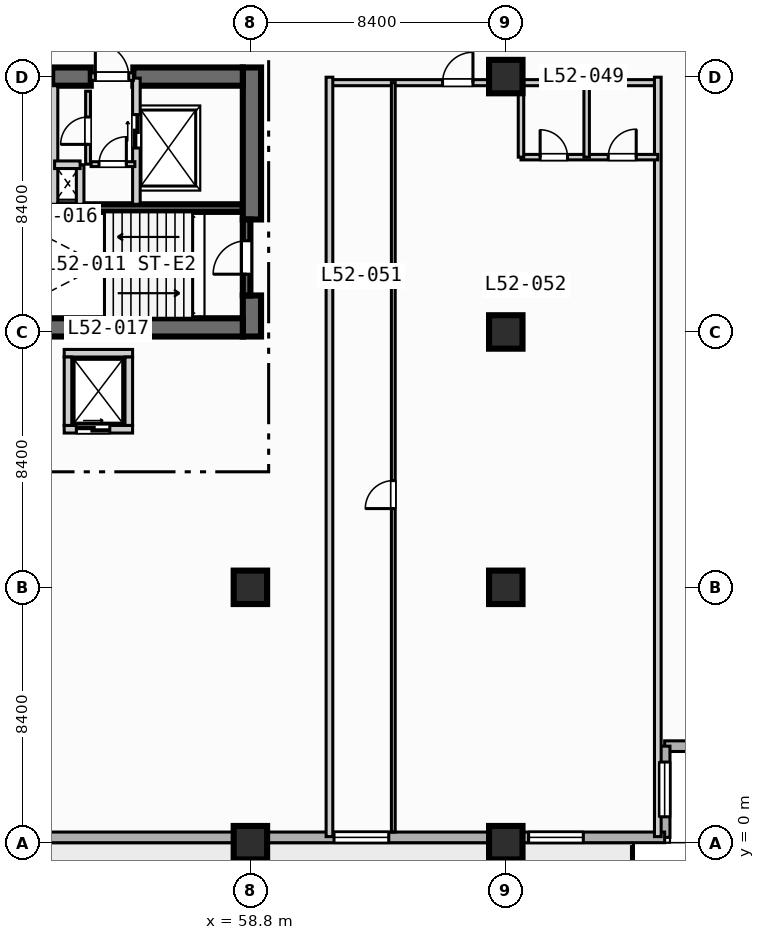
"""IFC4 building model, lengths in metres.
Left out: names, types, materials, properties, quantities, classifications, styles, units other than length and angle.
Written with IfcOpenShell. Run it as: python <this file> out.ifc"""

import sys

from ifc_helpers import new_model, si_unit, direction, frame, frame_2d, origin, origin_2d, place, context, subcontext, project, spatial, rectangle, extrude, element, fill, save


model = new_model("IFC4")
c1 = context("Model", 3, precision=1e-05, world=origin(), true_north=direction((0.0, 1.0)))
c2 = subcontext(c1, "Body", "Model", "MODEL_VIEW")
j1 = project(units=[si_unit("LENGTHUNIT", "METRE"), si_unit("PLANEANGLEUNIT", "RADIAN")], contexts=[c1])
p1 = place(None, origin())
s1 = spatial("IfcSite", under=j1, at=p1, CompositionType="ELEMENT")
p2 = place(p1, origin())
s2 = spatial("IfcBuilding", under=s1, at=p2, CompositionType="ELEMENT")
p3 = place(p2, frame((0.0, 0.0, 212.4)))
s3 = spatial("IfcBuildingStorey", under=s2, at=p3, CompositionType="ELEMENT", Elevation=212.4)
p4 = place(p3, frame((50.5, 20.875, 0.0), z_axis=(0.0, 0.0, 1.0), x_axis=(1.0, 0.0, 0.0)))
e1 = element("IfcWall", 1, at=p4, inside=s3, PredefinedType="SOLIDWALL", context=c2, shape_type="SweptSolid", body=[
    extrude(rectangle(XDim=8.05, YDim=0.25, at=frame_2d((4.025, 0.0))), origin(), (0.0, 0.0, 1.0), 3.47),
])
p5 = place(p3, frame((58.85, 16.65, 0.0), z_axis=(0.0, 0.0, 1.0), x_axis=(0.0, 1.0, 0.0)))
e2 = element("IfcWall", 2, at=p5, inside=s3, PredefinedType="SHEAR", context=c2, shape_type="SweptSolid", body=[
    extrude(rectangle(XDim=1.35, YDim=0.6, at=frame_2d((0.675, 0.0))), origin(), (0.0, 0.0, 1.0), 3.47),
])
p6 = place(p3, frame((58.85, 20.5, 0.0), z_axis=(0.0, 0.0, 1.0), x_axis=(0.0, 1.0, 0.0)))
e3 = element("IfcWall", 3, at=p6, inside=s3, PredefinedType="SHEAR", context=c2, shape_type="SweptSolid", body=[
    extrude(rectangle(XDim=5.0, YDim=0.6, at=frame_2d((2.5, 0.0))), origin(), (0.0, 0.0, 1.0), 3.47),
])
p7 = place(p3, frame((42.2, 16.95, 0.0), z_axis=(0.0, 0.0, 1.0), x_axis=(1.0, 0.0, 0.0)))
e4 = element("IfcWall", 4, at=p7, inside=s3, PredefinedType="SHEAR", context=c2, shape_type="SweptSolid", body=[
    extrude(rectangle(XDim=16.35, YDim=0.6, at=frame_2d((8.175, 0.0))), origin(), (0.0, 0.0, 1.0), 3.47),
])
p8 = place(p3, frame((52.28, 25.2, 0.0), z_axis=(0.0, 0.0, 1.0), x_axis=(1.0, 0.0, 0.0)))
e5 = element("IfcWall", 5, at=p8, inside=s3, PredefinedType="SHEAR", context=c2, shape_type="SweptSolid", body=[
    extrude(rectangle(XDim=1.27, YDim=0.6, at=frame_2d((0.635, 0.0))), origin(), (0.0, 0.0, 1.0), 3.47),
])
p9 = place(p3, frame((54.95, 25.2, 0.0), z_axis=(0.0, 0.0, 1.0), x_axis=(1.0, 0.0, 0.0)))
e6 = element("IfcWall", 6, at=p9, inside=s3, PredefinedType="SHEAR", context=c2, shape_type="SweptSolid", body=[
    extrude(rectangle(XDim=3.6, YDim=0.6, at=frame_2d((1.8, 0.0))), origin(), (0.0, 0.0, 1.0), 3.47),
])
for number, where, z_axis, x_axis in (
    (7, (58.8, 0.0, 0.0), (0.0, 0.0, 1.0), (1.0, 0.0, 0.0)),
    (8, (58.8, 8.4, 0.0), (0.0, 0.0, 1.0), (1.0, 0.0, 0.0)),
    (9, (67.2, 0.0, 0.0), (0.0, 0.0, 1.0), (1.0, 0.0, 0.0)),
    (10, (67.2, 8.4, 0.0), (0.0, 0.0, 1.0), (1.0, 0.0, 0.0)),
    (11, (67.2, 16.8, 0.0), (0.0, 0.0, 1.0), (1.0, 0.0, 0.0)),
    (12, (67.2, 25.2, 0.0), (0.0, 0.0, 1.0), (1.0, 0.0, 0.0)),
):
    element("IfcColumn", number, at=place(p3, frame(where, z_axis=z_axis, x_axis=x_axis)), inside=s3, PredefinedType="COLUMN", context=c2, shape_type="SweptSolid", body=[
        extrude(rectangle(XDim=1.1, YDim=1.1, at=origin_2d()), origin(), (0.0, 0.0, 1.0), 3.7),
    ])
p10 = place(p3, frame((75.425, 3.175, 0.0), z_axis=(0.0, 0.0, 1.0), x_axis=(-1.0, 0.0, 0.0)))
e13 = element("IfcWall", 13, at=p10, inside=s3, PredefinedType="STANDARD", context=c2, shape_type="SweptSolid", body=[
    extrude(rectangle(XDim=3.0, YDim=0.35, at=frame_2d((1.5, 0.0))), origin(), (0.0, 0.0, 1.0), 3.47),
])
p11 = place(p3, frame((72.425, 3.175, 0.0), z_axis=(0.0, 0.0, 1.0), x_axis=(0.0, -1.0, 0.0)))
e14 = element("IfcWall", 14, at=p11, inside=s3, PredefinedType="STANDARD", context=c2, shape_type="SweptSolid", body=[
    extrude(rectangle(XDim=3.0, YDim=0.35, at=frame_2d((1.5, 0.0))), origin(), (0.0, 0.0, 1.0), 3.47),
])
p12 = place(p11, frame((0.522, 0.0, 0.85)))
e15 = element("IfcOpeningElement", 15, at=p12, cuts=e14, PredefinedType="OPENING", context=c2, shape_type="SweptSolid", body=[
    extrude(rectangle(XDim=1.8, YDim=1.8, at=frame_2d((0.9, 0.9))), frame((0.0, 0.185, 0.0), z_axis=(0.0, -1.0, 0.0), x_axis=(1.0, 0.0, 0.0)), (0.0, 0.0, 1.0), 0.37),
])
p13 = place(p3, frame((72.425, 0.175, 0.0), z_axis=(0.0, 0.0, 1.0), x_axis=(-1.0, 0.0, 0.0)))
e16 = element("IfcWall", 16, at=p13, inside=s3, PredefinedType="STANDARD", context=c2, shape_type="SweptSolid", body=[
    extrude(rectangle(XDim=69.25, YDim=0.35, at=frame_2d((34.625, 0.0))), origin(), (0.0, 0.0, 1.0), 3.47),
])
p14 = place(p13, frame((50.725, 0.0, 0.0)))
e17 = element("IfcOpeningElement", 17, at=p14, cuts=e16, PredefinedType="OPENING", context=c2, shape_type="SweptSolid", body=[
    extrude(rectangle(XDim=1.4, YDim=2.2, at=frame_2d((0.7, 1.1))), frame((0.0, 0.185, 0.0), z_axis=(0.0, -1.0, 0.0), x_axis=(1.0, 0.0, 0.0)), (0.0, 0.0, 1.0), 0.37),
])
p15 = place(p13, frame((58.625, 0.0, 0.85)))
e18 = element("IfcOpeningElement", 18, at=p15, cuts=e16, PredefinedType="OPENING", context=c2, shape_type="SweptSolid", body=[
    extrude(rectangle(XDim=2.4, YDim=1.95, at=frame_2d((1.2, 0.975))), frame((0.0, 0.185, 0.0), z_axis=(0.0, -1.0, 0.0), x_axis=(1.0, 0.0, 0.0)), (0.0, 0.0, 1.0), 0.37),
])
p16 = place(p13, frame((33.725, 0.0, 0.85)))
e19 = element("IfcOpeningElement", 19, at=p16, cuts=e16, PredefinedType="OPENING", context=c2, shape_type="SweptSolid", body=[
    extrude(rectangle(XDim=1.8, YDim=1.8, at=frame_2d((0.9, 0.9))), frame((0.0, 0.185, 0.0), z_axis=(0.0, -1.0, 0.0), x_axis=(1.0, 0.0, 0.0)), (0.0, 0.0, 1.0), 0.37),
])
p17 = place(p13, frame((25.025, 0.0, 0.85)))
e20 = element("IfcOpeningElement", 20, at=p17, cuts=e16, PredefinedType="OPENING", context=c2, shape_type="SweptSolid", body=[
    extrude(rectangle(XDim=2.4, YDim=1.95, at=frame_2d((1.2, 0.975))), frame((0.0, 0.185, 0.0), z_axis=(0.0, -1.0, 0.0), x_axis=(1.0, 0.0, 0.0)), (0.0, 0.0, 1.0), 0.37),
])
p18 = place(p13, frame((9.075, 0.0, 0.85)))
e21 = element("IfcOpeningElement", 21, at=p18, cuts=e16, PredefinedType="OPENING", context=c2, shape_type="SweptSolid", body=[
    extrude(rectangle(XDim=1.8, YDim=1.8, at=frame_2d((0.9, 0.9))), frame((0.0, 0.185, 0.0), z_axis=(0.0, -1.0, 0.0), x_axis=(1.0, 0.0, 0.0)), (0.0, 0.0, 1.0), 0.37),
])
p19 = place(p13, frame((2.675, 0.0, 0.85)))
e22 = element("IfcOpeningElement", 22, at=p19, cuts=e16, PredefinedType="OPENING", context=c2, shape_type="SweptSolid", body=[
    extrude(rectangle(XDim=1.8, YDim=1.8, at=frame_2d((0.9, 0.9))), frame((0.0, 0.185, 0.0), z_axis=(0.0, -1.0, 0.0), x_axis=(1.0, 0.0, 0.0)), (0.0, 0.0, 1.0), 0.37),
])
p20 = place(p3, frame((58.675, 18.0, 0.0), z_axis=(0.0, 0.0, 1.0), x_axis=(0.0, 1.0, 0.0)))
e23 = element("IfcWall", 23, at=p20, inside=s3, PredefinedType="SOLIDWALL", context=c2, shape_type="SweptSolid", body=[
    extrude(rectangle(XDim=2.5, YDim=0.25, at=frame_2d((1.25, 0.0))), origin(), (0.0, 0.0, 1.0), 3.47),
])
p21 = place(p20, frame((0.7, 0.0, 0.0)))
e24 = element("IfcOpeningElement", 24, at=p21, cuts=e23, PredefinedType="OPENING", context=c2, shape_type="SweptSolid", body=[
    extrude(rectangle(XDim=1.1, YDim=2.15, at=frame_2d((0.55, 1.075))), frame((0.0, 0.135, 0.0), z_axis=(0.0, -1.0, 0.0), x_axis=(1.0, 0.0, 0.0)), (0.0, 0.0, 1.0), 0.27),
])
p22 = place(p3, frame((52.34, 21.0, 0.0), z_axis=(0.0, 0.0, 1.0), x_axis=(0.0, 1.0, 0.0)))
e25 = element("IfcWall", 25, at=p22, inside=s3, PredefinedType="SOLIDWALL", context=c2, shape_type="SweptSolid", body=[
    extrude(rectangle(XDim=3.9, YDim=0.25, at=frame_2d((1.95, 0.0))), origin(), (0.0, 0.0, 1.0), 3.47),
])
p23 = place(p3, frame((55.05, 21.0, 0.0), z_axis=(0.0, 0.0, 1.0), x_axis=(0.0, 1.0, 0.0)))
e26 = element("IfcWall", 26, at=p23, inside=s3, PredefinedType="SOLIDWALL", context=c2, shape_type="SweptSolid", body=[
    extrude(rectangle(XDim=4.15, YDim=0.25, at=frame_2d((2.075, 0.0))), origin(), (0.0, 0.0, 1.0), 3.47),
])
p24 = place(p23, frame((1.85, 0.0, 0.0)))
e27 = element("IfcOpeningElement", 27, at=p24, cuts=e26, PredefinedType="OPENING", context=c2, shape_type="SweptSolid", body=[
    extrude(rectangle(XDim=1.1, YDim=2.15, at=frame_2d((0.55, 1.075))), frame((0.0, 0.135, 0.0), z_axis=(0.0, -1.0, 0.0), x_axis=(1.0, 0.0, 0.0)), (0.0, 0.0, 1.0), 0.27),
])
p25 = place(p3, frame((53.55, 25.2, 0.0), z_axis=(0.0, 0.0, 1.0), x_axis=(1.0, 0.0, 0.0)))
e28 = element("IfcWall", 28, at=p25, inside=s3, PredefinedType="SOLIDWALL", context=c2, shape_type="SweptSolid", body=[
    extrude(rectangle(XDim=1.4, YDim=0.25, at=frame_2d((0.7, 0.0))), origin(), (0.0, 0.0, 1.0), 3.47),
])
p26 = place(p25, frame((0.15, 0.0, 0.0)))
e29 = element("IfcOpeningElement", 29, at=p26, cuts=e28, PredefinedType="OPENING", context=c2, shape_type="SweptSolid", body=[
    extrude(rectangle(XDim=1.1, YDim=2.15, at=frame_2d((0.55, 1.075))), frame((0.0, 0.135, 0.0), z_axis=(0.0, -1.0, 0.0), x_axis=(1.0, 0.0, 0.0)), (0.0, 0.0, 1.0), 0.27),
])
p27 = place(p3, frame((53.2, 21.0, 0.0), z_axis=(0.0, 0.0, 1.0), x_axis=(0.0, 1.0, 0.0)))
e30 = element("IfcWall", 30, at=p27, inside=s3, PredefinedType="SOLIDWALL", context=c2, shape_type="SweptSolid", body=[
    extrude(rectangle(XDim=1.3, YDim=0.25, at=frame_2d((0.65, 0.0))), origin(), (0.0, 0.0, 1.0), 3.47),
])
p28 = place(p3, frame((52.36, 22.3, 0.0), z_axis=(0.0, 0.0, 1.0), x_axis=(1.0, 0.0, 0.0)))
e31 = element("IfcWall", 31, at=p28, inside=s3, PredefinedType="SOLIDWALL", context=c2, shape_type="SweptSolid", body=[
    extrude(rectangle(XDim=0.84, YDim=0.25, at=frame_2d((0.42, 0.0))), origin(), (0.0, 0.0, 1.0), 3.47),
])
p29 = place(p3, frame((53.56, 22.32, 0.0), z_axis=(0.0, 0.0, 1.0), x_axis=(1.0, 0.0, 0.0)))
e32 = element("IfcWall", 32, at=p29, inside=s3, PredefinedType="PARTITIONING", context=c2, shape_type="SweptSolid", body=[
    extrude(rectangle(XDim=1.44, YDim=0.16, at=frame_2d((0.72, 0.0))), origin(), (0.0, 0.0, 1.0), 3.47),
])
p30 = place(p29, frame((0.26, 0.0, 0.0)))
e33 = element("IfcOpeningElement", 33, at=p30, cuts=e32, PredefinedType="OPENING", context=c2, shape_type="SweptSolid", body=[
    extrude(rectangle(XDim=0.9, YDim=2.1, at=frame_2d((0.45, 1.05))), frame((0.0, 0.09, 0.0), z_axis=(0.0, -1.0, 0.0), x_axis=(1.0, 0.0, 0.0)), (0.0, 0.0, 1.0), 0.18),
])
p31 = place(p3, frame((53.46, 22.32, 0.0), z_axis=(0.0, 0.0, 1.0), x_axis=(0.0, 1.0, 0.0)))
e34 = element("IfcWall", 34, at=p31, inside=s3, PredefinedType="PARTITIONING", context=c2, shape_type="SweptSolid", body=[
    extrude(rectangle(XDim=2.4, YDim=0.16, at=frame_2d((1.2, 0.0))), origin(), (0.0, 0.0, 1.0), 3.47),
])
p32 = place(p31, frame((0.65, 0.0, 0.0)))
e35 = element("IfcOpeningElement", 35, at=p32, cuts=e34, PredefinedType="OPENING", context=c2, shape_type="SweptSolid", body=[
    extrude(rectangle(XDim=0.9, YDim=2.1, at=frame_2d((0.45, 1.05))), frame((0.0, 0.09, 0.0), z_axis=(0.0, -1.0, 0.0), x_axis=(1.0, 0.0, 0.0)), (0.0, 0.0, 1.0), 0.18),
])
p33 = place(p3, frame((52.675, 13.6, 0.0), z_axis=(0.0, 0.0, 1.0), x_axis=(1.0, 0.0, 0.0)))
e36 = element("IfcWall", 36, at=p33, inside=s3, PredefinedType="SOLIDWALL", context=c2, shape_type="SweptSolid", body=[
    extrude(rectangle(XDim=2.25, YDim=0.25, at=frame_2d((1.125, 0.0))), origin(), (0.0, 0.0, 1.0), 3.47),
])
p34 = place(p33, frame((0.4, 0.0, 0.0)))
e37 = element("IfcOpeningElement", 37, at=p34, cuts=e36, PredefinedType="OPENING", context=c2, shape_type="SweptSolid", body=[
    extrude(rectangle(XDim=1.1, YDim=2.15, at=frame_2d((0.55, 1.075))), frame((0.0, 0.135, 0.0), z_axis=(0.0, -1.0, 0.0), x_axis=(1.0, 0.0, 0.0)), (0.0, 0.0, 1.0), 0.27),
])
for number, where, z_axis, x_axis in (
    (38, (52.675, 16.1, 0.0), (0.0, 0.0, 1.0), (1.0, 0.0, 0.0)),
    (39, (52.8, 13.725, 0.0), (0.0, 0.0, 1.0), (0.0, 1.0, 0.0)),
    (40, (54.8, 13.725, 0.0), (0.0, 0.0, 1.0), (0.0, 1.0, 0.0)),
):
    element("IfcWall", number, at=place(p3, frame(where, z_axis=z_axis, x_axis=x_axis)), inside=s3, PredefinedType="SOLIDWALL", context=c2, shape_type="SweptSolid", body=[
        extrude(rectangle(XDim=2.25, YDim=0.25, at=frame_2d((1.125, 0.0))), origin(), (0.0, 0.0, 1.0), 3.47),
    ])
p35 = place(p3, frame((61.4, 25.0, 0.0), z_axis=(0.0, 0.0, 1.0), x_axis=(1.0, 0.0, 0.0)))
e41 = element("IfcWall", 41, at=p35, inside=s3, PredefinedType="PARTITIONING", context=c2, shape_type="SweptSolid", body=[
    extrude(rectangle(XDim=10.8, YDim=0.2, at=frame_2d((5.4, 0.0))), origin(), (0.0, 0.0, 1.0), 2.82),
])
p36 = place(p35, frame((3.72, 0.0, 0.0)))
e42 = element("IfcOpeningElement", 42, at=p36, cuts=e41, PredefinedType="OPENING", context=c2, shape_type="SweptSolid", body=[
    extrude(rectangle(XDim=1.0, YDim=2.15, at=frame_2d((0.5, 1.075))), frame((0.0, 0.11, 0.0), z_axis=(0.0, -1.0, 0.0), x_axis=(1.0, 0.0, 0.0)), (0.0, 0.0, 1.0), 0.22),
])
for number, where, z_axis, x_axis in (
    (43, (61.4, 0.2, 0.0), (0.0, 0.0, 1.0), (0.0, 1.0, 0.0)),
    (44, (72.2, 0.2, 0.0), (0.0, 0.0, 1.0), (0.0, 1.0, 0.0)),
):
    element("IfcWall", number, at=place(p3, frame(where, z_axis=z_axis, x_axis=x_axis)), inside=s3, PredefinedType="PARTITIONING", context=c2, shape_type="SweptSolid", body=[
        extrude(rectangle(XDim=24.98, YDim=0.22, at=frame_2d((12.49, 0.0))), origin(), (0.0, 0.0, 1.0), 3.47),
    ])
p37 = place(p3, frame((67.7, 22.55, 0.0), z_axis=(0.0, 0.0, 1.0), x_axis=(1.0, 0.0, 0.0)))
e45 = element("IfcWall", 45, at=p37, inside=s3, PredefinedType="PLUMBINGWALL", context=c2, shape_type="SweptSolid", body=[
    extrude(rectangle(XDim=4.5, YDim=0.18, at=frame_2d((2.25, 0.0))), origin(), (0.0, 0.0, 1.0), 3.47),
])
p38 = place(p37, frame((0.63, 0.0, 0.0)))
e46 = element("IfcOpeningElement", 46, at=p38, cuts=e45, PredefinedType="OPENING", context=c2, shape_type="SweptSolid", body=[
    extrude(rectangle(XDim=0.9, YDim=2.1, at=frame_2d((0.45, 1.05))), frame((0.0, 0.1, 0.0), z_axis=(0.0, -1.0, 0.0), x_axis=(1.0, 0.0, 0.0)), (0.0, 0.0, 1.0), 0.2),
])
p39 = place(p37, frame((2.87, 0.0, 0.0)))
e47 = element("IfcOpeningElement", 47, at=p39, cuts=e45, PredefinedType="OPENING", context=c2, shape_type="SweptSolid", body=[
    extrude(rectangle(XDim=0.92, YDim=2.1, at=frame_2d((0.46, 1.05))), frame((0.0, 0.1, 0.0), z_axis=(0.0, -1.0, 0.0), x_axis=(1.0, 0.0, 0.0)), (0.0, 0.0, 1.0), 0.2),
])
for number, where, z_axis, x_axis in (
    (48, (67.7, 22.55, 0.0), (0.0, 0.0, 1.0), (0.0, 1.0, 0.0)),
    (49, (69.86, 22.55, 0.0), (0.0, 0.0, 1.0), (0.0, 1.0, 0.0)),
):
    element("IfcWall", number, at=place(p3, frame(where, z_axis=z_axis, x_axis=x_axis)), inside=s3, PredefinedType="PLUMBINGWALL", context=c2, shape_type="SweptSolid", body=[
        extrude(rectangle(XDim=2.45, YDim=0.18, at=frame_2d((1.225, 0.0))), origin(), (0.0, 0.0, 1.0), 3.47),
    ])
p40 = place(p3, frame((63.5, 0.35, 0.0), z_axis=(0.0, 0.0, 1.0), x_axis=(0.0, 1.0, 0.0)))
e50 = element("IfcWall", 50, at=p40, inside=s3, PredefinedType="PARTITIONING", context=c2, shape_type="SweptSolid", body=[
    extrude(rectangle(XDim=24.65, YDim=0.125, at=frame_2d((12.325, 0.0))), origin(), (0.0, 0.0, 1.0), 3.47),
])
p41 = place(p40, frame((10.64, 0.0, 0.0)))
e51 = element("IfcOpeningElement", 51, at=p41, cuts=e50, PredefinedType="OPENING", context=c2, shape_type="SweptSolid", body=[
    extrude(rectangle(XDim=0.92, YDim=2.1, at=frame_2d((0.46, 1.05))), frame((0.0, 0.073, 0.0), z_axis=(0.0, -1.0, 0.0), x_axis=(1.0, 0.0, 0.0)), (0.0, 0.0, 1.0), 0.145),
])
p42 = place(p12, origin())
e52 = element("IfcWindow", 52, at=p42, inside=s3, PartitioningType="SINGLE_PANEL", PredefinedType="WINDOW", context=c2, shape_type="SweptSolid", body=[
    extrude(rectangle(XDim=1.8, YDim=1.8, at=frame_2d((0.9, 0.9))), frame((0.0, 0.03, 0.0), z_axis=(0.0, -1.0, 0.0), x_axis=(1.0, 0.0, 0.0)), (0.0, 0.0, 1.0), 0.06),
])
fill(e15, e52)
p43 = place(p18, origin())
e53 = element("IfcWindow", 53, at=p43, inside=s3, PartitioningType="SINGLE_PANEL", PredefinedType="WINDOW", context=c2, shape_type="SweptSolid", body=[
    extrude(rectangle(XDim=1.8, YDim=1.8, at=frame_2d((0.9, 0.9))), frame((0.0, 0.03, 0.0), z_axis=(0.0, -1.0, 0.0), x_axis=(1.0, 0.0, 0.0)), (0.0, 0.0, 1.0), 0.06),
])
fill(e21, e53)
p44 = place(p19, origin())
e54 = element("IfcWindow", 54, at=p44, inside=s3, PartitioningType="SINGLE_PANEL", PredefinedType="WINDOW", context=c2, shape_type="SweptSolid", body=[
    extrude(rectangle(XDim=1.8, YDim=1.8, at=frame_2d((0.9, 0.9))), frame((0.0, 0.03, 0.0), z_axis=(0.0, -1.0, 0.0), x_axis=(1.0, 0.0, 0.0)), (0.0, 0.0, 1.0), 0.06),
])
fill(e22, e54)
p45 = place(p21, origin())
e55 = element("IfcDoor", 55, at=p45, inside=s3, OperationType="SINGLE_SWING_LEFT", PredefinedType="DOOR", context=c2, shape_type="SweptSolid", body=[
    extrude(rectangle(XDim=1.1, YDim=2.15, at=frame_2d((0.55, 1.075))), frame((0.0, 0.025, 0.0), z_axis=(0.0, -1.0, 0.0), x_axis=(1.0, 0.0, 0.0)), (0.0, 0.0, 1.0), 0.05),
])
fill(e24, e55)
p46 = place(p24, origin())
e56 = element("IfcDoor", 56, at=p46, inside=s3, OperationType="SLIDING_TO_LEFT", PredefinedType="DOOR", context=c2, shape_type="SweptSolid", body=[
    extrude(rectangle(XDim=1.1, YDim=2.15, at=frame_2d((0.55, 1.075))), frame((0.0, 0.025, 0.0), z_axis=(0.0, -1.0, 0.0), x_axis=(1.0, 0.0, 0.0)), (0.0, 0.0, 1.0), 0.05),
])
fill(e27, e56)
p47 = place(p26, origin())
e57 = element("IfcDoor", 57, at=p47, inside=s3, OperationType="SINGLE_SWING_LEFT", PredefinedType="DOOR", context=c2, shape_type="SweptSolid", body=[
    extrude(rectangle(XDim=1.1, YDim=2.15, at=frame_2d((0.55, 1.075))), frame((0.0, 0.025, 0.0), z_axis=(0.0, -1.0, 0.0), x_axis=(1.0, 0.0, 0.0)), (0.0, 0.0, 1.0), 0.05),
])
fill(e29, e57)
p48 = place(p30, origin())
e58 = element("IfcDoor", 58, at=p48, inside=s3, OperationType="SINGLE_SWING_RIGHT", PredefinedType="DOOR", context=c2, shape_type="SweptSolid", body=[
    extrude(rectangle(XDim=0.9, YDim=2.1, at=frame_2d((0.45, 1.05))), frame((0.0, 0.025, 0.0), z_axis=(0.0, -1.0, 0.0), x_axis=(1.0, 0.0, 0.0)), (0.0, 0.0, 1.0), 0.05),
])
fill(e33, e58)
p49 = place(p32, origin())
e59 = element("IfcDoor", 59, at=p49, inside=s3, OperationType="SINGLE_SWING_LEFT", PredefinedType="DOOR", context=c2, shape_type="SweptSolid", body=[
    extrude(rectangle(XDim=0.9, YDim=2.1, at=frame_2d((0.45, 1.05))), frame((0.0, 0.025, 0.0), z_axis=(0.0, -1.0, 0.0), x_axis=(1.0, 0.0, 0.0)), (0.0, 0.0, 1.0), 0.05),
])
fill(e35, e59)
p50 = place(p34, origin())
e60 = element("IfcDoor", 60, at=p50, inside=s3, OperationType="SLIDING_TO_LEFT", PredefinedType="DOOR", context=c2, shape_type="SweptSolid", body=[
    extrude(rectangle(XDim=1.1, YDim=2.15, at=frame_2d((0.55, 1.075))), frame((0.0, 0.025, 0.0), z_axis=(0.0, -1.0, 0.0), x_axis=(1.0, 0.0, 0.0)), (0.0, 0.0, 1.0), 0.05),
])
fill(e37, e60)
p51 = place(p36, origin())
e61 = element("IfcDoor", 61, at=p51, inside=s3, OperationType="SINGLE_SWING_RIGHT", PredefinedType="DOOR", context=c2, shape_type="SweptSolid", body=[
    extrude(rectangle(XDim=1.0, YDim=2.15, at=frame_2d((0.5, 1.075))), frame((0.0, 0.025, 0.0), z_axis=(0.0, -1.0, 0.0), x_axis=(1.0, 0.0, 0.0)), (0.0, 0.0, 1.0), 0.05),
])
fill(e42, e61)
p52 = place(p38, origin())
e62 = element("IfcDoor", 62, at=p52, inside=s3, OperationType="SINGLE_SWING_LEFT", PredefinedType="DOOR", context=c2, shape_type="SweptSolid", body=[
    extrude(rectangle(XDim=0.9, YDim=2.1, at=frame_2d((0.45, 1.05))), frame((0.0, 0.025, 0.0), z_axis=(0.0, -1.0, 0.0), x_axis=(1.0, 0.0, 0.0)), (0.0, 0.0, 1.0), 0.05),
])
fill(e46, e62)
p53 = place(p39, origin())
e63 = element("IfcDoor", 63, at=p53, inside=s3, OperationType="SINGLE_SWING_RIGHT", PredefinedType="DOOR", context=c2, shape_type="SweptSolid", body=[
    extrude(rectangle(XDim=0.92, YDim=2.1, at=frame_2d((0.46, 1.05))), frame((0.0, 0.025, 0.0), z_axis=(0.0, -1.0, 0.0), x_axis=(1.0, 0.0, 0.0)), (0.0, 0.0, 1.0), 0.05),
])
fill(e47, e63)
p54 = place(p41, origin())
e64 = element("IfcDoor", 64, at=p54, inside=s3, OperationType="SINGLE_SWING_LEFT", PredefinedType="DOOR", context=c2, shape_type="SweptSolid", body=[
    extrude(rectangle(XDim=0.92, YDim=2.1, at=frame_2d((0.46, 1.05))), frame((0.0, 0.025, 0.0), z_axis=(0.0, -1.0, 0.0), x_axis=(1.0, 0.0, 0.0)), (0.0, 0.0, 1.0), 0.05),
])
fill(e51, e64)
save(model, sys.argv[1])
